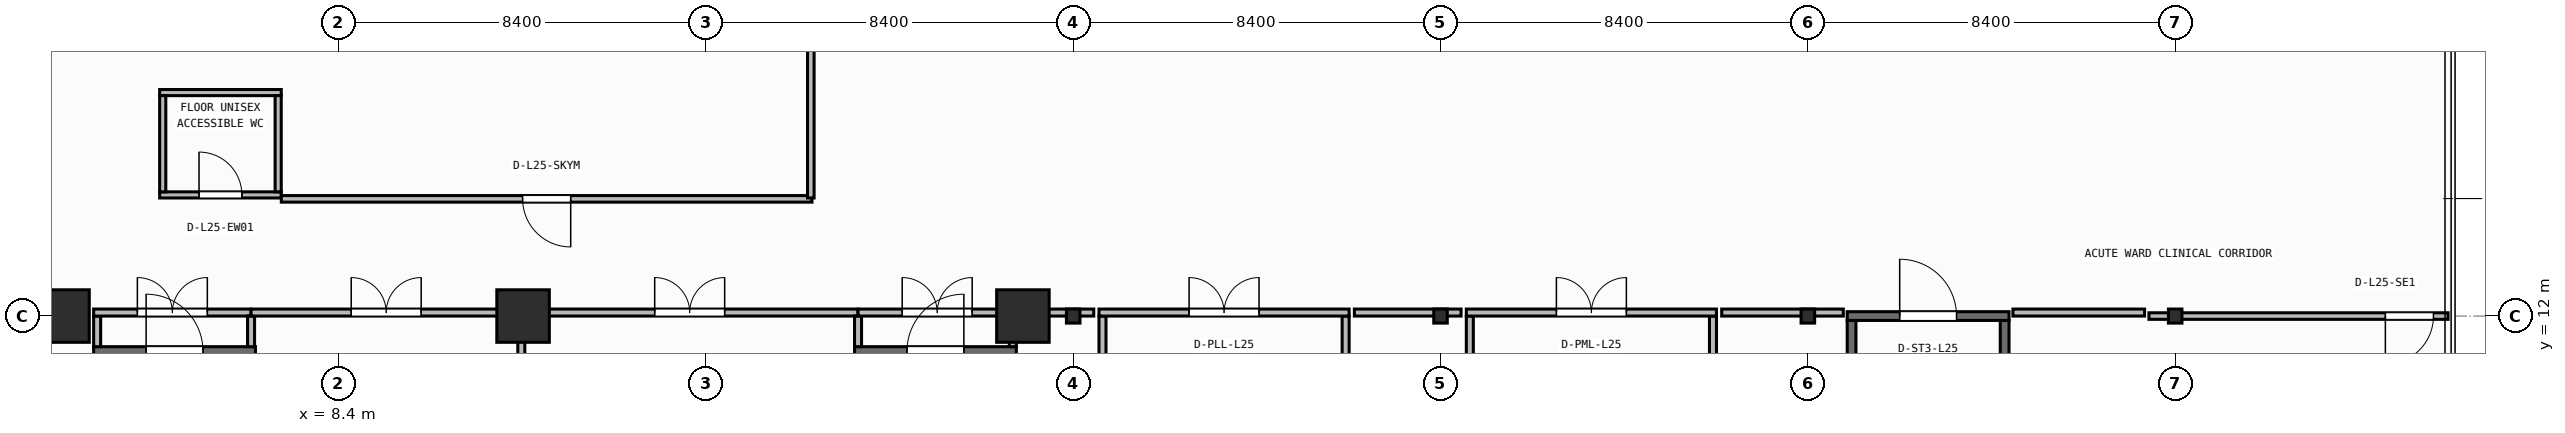
"""IFC4 building model, lengths in metres.
Left out: names, types, materials, properties, quantities, classifications, styles, units other than length and angle.
Written with IfcOpenShell. Run it as: python <this file> out.ifc"""

import sys

from ifc_helpers import new_model, si_unit, direction, frame, frame_2d, origin, origin_2d, place, context, subcontext, project, spatial, rectangle, i_section, extrude, element, fill, save


model = new_model("IFC4")
c1 = context("Model", 3, precision=1e-05, world=origin(), true_north=direction((0.0, 1.0)))
c2 = subcontext(c1, "Body", "Model", "MODEL_VIEW")
j1 = project(units=[si_unit("LENGTHUNIT", "METRE"), si_unit("PLANEANGLEUNIT", "RADIAN")], contexts=[c1])
p1 = place(None, origin())
s1 = spatial("IfcSite", under=j1, at=p1, CompositionType="ELEMENT")
p2 = place(p1, origin())
s2 = spatial("IfcBuilding", under=s1, at=p2, CompositionType="ELEMENT")
p3 = place(p2, frame((0.0, 0.0, 103.35)))
s3 = spatial("IfcBuildingStorey", under=s2, at=p3, CompositionType="ELEMENT", Elevation=103.35)
for number, where, z_axis, x_axis in (
    (1, (2.1, 12.0, 0.0), (0.0, 0.0, 1.0), (1.0, 0.0, 0.0)),
    (2, (12.62, 12.0, 0.0), (0.0, 0.0, 1.0), (1.0, 0.0, 0.0)),
    (3, (24.05, 12.0, 0.0), (0.0, 0.0, 1.0), (1.0, 0.0, 0.0)),
):
    element("IfcColumn", number, at=place(p3, frame(where, z_axis=z_axis, x_axis=x_axis)), inside=s3, PredefinedType="COLUMN", context=c2, shape_type="SweptSolid", body=[
        extrude(rectangle(XDim=1.2, YDim=1.2, at=origin_2d()), origin(), (0.0, 0.0, 1.0), 3.95),
    ])
for number, where, z_axis, x_axis in (
    (4, (25.2, 12.0, 0.0), (0.0, 0.0, 1.0), (1.0, 0.0, 0.0)),
    (5, (33.6, 12.0, 0.0), (0.0, 0.0, 1.0), (1.0, 0.0, 0.0)),
    (6, (42.0, 12.0, 0.0), (0.0, 0.0, 1.0), (1.0, 0.0, 0.0)),
    (7, (50.4, 12.0, 0.0), (0.0, 0.0, 1.0), (1.0, 0.0, 0.0)),
):
    element("IfcColumn", number, at=place(p3, frame(where, z_axis=z_axis, x_axis=x_axis)), inside=s3, PredefinedType="COLUMN", context=c2, shape_type="SweptSolid", body=[
        extrude(i_section(OverallWidth=0.309, OverallDepth=0.321, WebThickness=0.014, FlangeThickness=0.022, FilletRadius=0.017, at=origin_2d()), origin(), (0.0, 0.0, 1.0), 3.95),
    ])
p4 = place(p3, frame((2.8, 11.2, 0.0), z_axis=(0.0, 0.0, 1.0), x_axis=(1.0, 0.0, 0.0)))
e8 = element("IfcWall", 8, at=p4, inside=s3, PredefinedType="SHEAR", context=c2, shape_type="SweptSolid", body=[
    extrude(rectangle(XDim=3.7, YDim=0.2, at=frame_2d((1.85, 0.0))), origin(), (0.0, 0.0, 1.0), 3.71),
])
p5 = place(p4, frame((1.2, 0.0, 0.0)))
e9 = element("IfcOpeningElement", 9, at=p5, cuts=e8, PredefinedType="OPENING", context=c2, shape_type="SweptSolid", body=[
    extrude(rectangle(XDim=1.3, YDim=2.15, at=frame_2d((0.65, 1.075))), frame((0.0, 0.11, 0.0), z_axis=(0.0, -1.0, 0.0), x_axis=(1.0, 0.0, 0.0)), (0.0, 0.0, 1.0), 0.22),
])
p6 = place(p3, frame((20.2, 11.2, 0.0), z_axis=(0.0, 0.0, 1.0), x_axis=(1.0, 0.0, 0.0)))
e10 = element("IfcWall", 10, at=p6, inside=s3, PredefinedType="SHEAR", context=c2, shape_type="SweptSolid", body=[
    extrude(rectangle(XDim=3.7, YDim=0.2, at=frame_2d((1.85, 0.0))), origin(), (0.0, 0.0, 1.0), 3.71),
])
p7 = place(p6, frame((1.2, 0.0, 0.0)))
e11 = element("IfcOpeningElement", 11, at=p7, cuts=e10, PredefinedType="OPENING", context=c2, shape_type="SweptSolid", body=[
    extrude(rectangle(XDim=1.3, YDim=2.15, at=frame_2d((0.65, 1.075))), frame((0.0, 0.11, 0.0), z_axis=(0.0, -1.0, 0.0), x_axis=(1.0, 0.0, 0.0)), (0.0, 0.0, 1.0), 0.22),
])
for number, where, z_axis, x_axis in (
    (12, (43.0, 4.3, 0.0), (0.0, 0.0, 1.0), (0.0, 1.0, 0.0)),
    (13, (46.5, 4.3, 0.0), (0.0, 0.0, 1.0), (0.0, 1.0, 0.0)),
):
    element("IfcWall", number, at=place(p3, frame(where, z_axis=z_axis, x_axis=x_axis)), inside=s3, PredefinedType="SHEAR", context=c2, shape_type="SweptSolid", body=[
        extrude(rectangle(XDim=7.6, YDim=0.2, at=frame_2d((3.8, 0.0))), origin(), (0.0, 0.0, 1.0), 3.71),
    ])
p8 = place(p3, frame((42.9, 12.0, 0.0), z_axis=(0.0, 0.0, 1.0), x_axis=(1.0, 0.0, 0.0)))
e14 = element("IfcWall", 14, at=p8, inside=s3, PredefinedType="SHEAR", context=c2, shape_type="SweptSolid", body=[
    extrude(rectangle(XDim=3.7, YDim=0.2, at=frame_2d((1.85, 0.0))), origin(), (0.0, 0.0, 1.0), 3.71),
])
p9 = place(p8, frame((1.2, 0.0, 0.0)))
e15 = element("IfcOpeningElement", 15, at=p9, cuts=e14, PredefinedType="OPENING", context=c2, shape_type="SweptSolid", body=[
    extrude(rectangle(XDim=1.3, YDim=2.15, at=frame_2d((0.65, 1.075))), frame((0.0, 0.11, 0.0), z_axis=(0.0, -1.0, 0.0), x_axis=(1.0, 0.0, 0.0)), (0.0, 0.0, 1.0), 0.22),
])
p10 = place(p3, frame((2.88, 11.3, 0.0), z_axis=(0.0, 0.0, 1.0), x_axis=(0.0, 1.0, 0.0)))
e16 = element("IfcWall", 16, at=p10, inside=s3, PredefinedType="PARTITIONING", context=c2, shape_type="SweptSolid", body=[
    extrude(rectangle(XDim=0.7, YDim=0.16, at=frame_2d((0.35, 0.0))), origin(), (0.0, 0.0, 1.0), 3.71),
])
p11 = place(p3, frame((2.8, 12.08, 0.0), z_axis=(0.0, 0.0, 1.0), x_axis=(1.0, 0.0, 0.0)))
e17 = element("IfcWall", 17, at=p11, inside=s3, PredefinedType="PARTITIONING", context=c2, shape_type="SweptSolid", body=[
    extrude(rectangle(XDim=3.6, YDim=0.16, at=frame_2d((1.8, 0.0))), origin(), (0.0, 0.0, 1.0), 3.083),
])
p12 = place(p11, frame((1.0, 0.0, 0.0)))
e18 = element("IfcOpeningElement", 18, at=p12, cuts=e17, PredefinedType="OPENING", context=c2, shape_type="SweptSolid", body=[
    extrude(rectangle(XDim=1.6, YDim=2.05, at=frame_2d((0.8, 1.025))), frame((0.0, 0.09, 0.0), z_axis=(0.0, -1.0, 0.0), x_axis=(1.0, 0.0, 0.0)), (0.0, 0.0, 1.0), 0.18),
])
p13 = place(p3, frame((6.4, 11.3, 0.0), z_axis=(0.0, 0.0, 1.0), x_axis=(0.0, 1.0, 0.0)))
e19 = element("IfcWall", 19, at=p13, inside=s3, PredefinedType="PARTITIONING", context=c2, shape_type="SweptSolid", body=[
    extrude(rectangle(XDim=0.7, YDim=0.16, at=frame_2d((0.35, 0.0))), origin(), (0.0, 0.0, 1.0), 3.71),
])
p14 = place(p3, frame((6.4, 12.08, 0.0), z_axis=(0.0, 0.0, 1.0), x_axis=(1.0, 0.0, 0.0)))
e20 = element("IfcWall", 20, at=p14, inside=s3, PredefinedType="PARTITIONING", context=c2, shape_type="SweptSolid", body=[
    extrude(rectangle(XDim=6.18, YDim=0.16, at=frame_2d((3.09, 0.0))), origin(), (0.0, 0.0, 1.0), 3.083),
])
p15 = place(p14, frame((2.29, 0.0, 0.0)))
e21 = element("IfcOpeningElement", 21, at=p15, cuts=e20, PredefinedType="OPENING", context=c2, shape_type="SweptSolid", body=[
    extrude(rectangle(XDim=1.6, YDim=2.05, at=frame_2d((0.8, 1.025))), frame((0.0, 0.09, 0.0), z_axis=(0.0, -1.0, 0.0), x_axis=(1.0, 0.0, 0.0)), (0.0, 0.0, 1.0), 0.18),
])
p16 = place(p3, frame((12.58, 9.21, 0.0), z_axis=(0.0, 0.0, 1.0), x_axis=(0.0, 1.0, 0.0)))
e22 = element("IfcWall", 22, at=p16, inside=s3, PredefinedType="PARTITIONING", context=c2, shape_type="SweptSolid", body=[
    extrude(rectangle(XDim=2.79, YDim=0.16, at=frame_2d((1.395, 0.0))), origin(), (0.0, 0.0, 1.0), 3.71),
])
p17 = place(p3, frame((12.58, 12.08, 0.0), z_axis=(0.0, 0.0, 1.0), x_axis=(1.0, 0.0, 0.0)))
e23 = element("IfcWall", 23, at=p17, inside=s3, PredefinedType="PARTITIONING", context=c2, shape_type="SweptSolid", body=[
    extrude(rectangle(XDim=7.7, YDim=0.16, at=frame_2d((3.85, 0.0))), origin(), (0.0, 0.0, 1.0), 3.083),
])
p18 = place(p17, frame((3.05, 0.0, 0.0)))
e24 = element("IfcOpeningElement", 24, at=p18, cuts=e23, PredefinedType="OPENING", context=c2, shape_type="SweptSolid", body=[
    extrude(rectangle(XDim=1.6, YDim=2.05, at=frame_2d((0.8, 1.025))), frame((0.0, 0.09, 0.0), z_axis=(0.0, -1.0, 0.0), x_axis=(1.0, 0.0, 0.0)), (0.0, 0.0, 1.0), 0.18),
])
p19 = place(p3, frame((20.28, 11.3, 0.0), z_axis=(0.0, 0.0, 1.0), x_axis=(0.0, 1.0, 0.0)))
e25 = element("IfcWall", 25, at=p19, inside=s3, PredefinedType="PARTITIONING", context=c2, shape_type="SweptSolid", body=[
    extrude(rectangle(XDim=0.7, YDim=0.16, at=frame_2d((0.35, 0.0))), origin(), (0.0, 0.0, 1.0), 3.71),
])
p20 = place(p3, frame((20.28, 12.08, 0.0), z_axis=(0.0, 0.0, 1.0), x_axis=(1.0, 0.0, 0.0)))
e26 = element("IfcWall", 26, at=p20, inside=s3, PredefinedType="PARTITIONING", context=c2, shape_type="SweptSolid", body=[
    extrude(rectangle(XDim=3.62, YDim=0.16, at=frame_2d((1.81, 0.0))), origin(), (0.0, 0.0, 1.0), 3.083),
])
p21 = place(p20, frame((1.01, 0.0, 0.0)))
e27 = element("IfcOpeningElement", 27, at=p21, cuts=e26, PredefinedType="OPENING", context=c2, shape_type="SweptSolid", body=[
    extrude(rectangle(XDim=1.6, YDim=2.05, at=frame_2d((0.8, 1.025))), frame((0.0, 0.09, 0.0), z_axis=(0.0, -1.0, 0.0), x_axis=(1.0, 0.0, 0.0)), (0.0, 0.0, 1.0), 0.18),
])
p22 = place(p3, frame((23.82, 11.3, 0.0), z_axis=(0.0, 0.0, 1.0), x_axis=(0.0, 1.0, 0.0)))
e28 = element("IfcWall", 28, at=p22, inside=s3, PredefinedType="PARTITIONING", context=c2, shape_type="SweptSolid", body=[
    extrude(rectangle(XDim=0.7, YDim=0.16, at=frame_2d((0.35, 0.0))), origin(), (0.0, 0.0, 1.0), 3.71),
])
for number, where, z_axis, x_axis in (
    (29, (25.87, 8.61, 0.0), (0.0, 0.0, 1.0), (0.0, 1.0, 0.0)),
    (30, (31.43, 8.61, 0.0), (0.0, 0.0, 1.0), (0.0, 1.0, 0.0)),
):
    element("IfcWall", number, at=place(p3, frame(where, z_axis=z_axis, x_axis=x_axis)), inside=s3, PredefinedType="PARTITIONING", context=c2, shape_type="SweptSolid", body=[
        extrude(rectangle(XDim=3.39, YDim=0.16, at=frame_2d((1.695, 0.0))), origin(), (0.0, 0.0, 1.0), 3.71),
    ])
p23 = place(p3, frame((25.79, 12.08, 0.0), z_axis=(0.0, 0.0, 1.0), x_axis=(1.0, 0.0, 0.0)))
e31 = element("IfcWall", 31, at=p23, inside=s3, PredefinedType="PARTITIONING", context=c2, shape_type="SweptSolid", body=[
    extrude(rectangle(XDim=5.72, YDim=0.16, at=frame_2d((2.86, 0.0))), origin(), (0.0, 0.0, 1.0), 3.083),
])
p24 = place(p23, frame((2.06, 0.0, 0.0)))
e32 = element("IfcOpeningElement", 32, at=p24, cuts=e31, PredefinedType="OPENING", context=c2, shape_type="SweptSolid", body=[
    extrude(rectangle(XDim=1.6, YDim=2.05, at=frame_2d((0.8, 1.025))), frame((0.0, 0.09, 0.0), z_axis=(0.0, -1.0, 0.0), x_axis=(1.0, 0.0, 0.0)), (0.0, 0.0, 1.0), 0.18),
])
for number, where, z_axis, x_axis in (
    (33, (34.27, 8.61, 0.0), (0.0, 0.0, 1.0), (0.0, 1.0, 0.0)),
    (34, (39.83, 8.61, 0.0), (0.0, 0.0, 1.0), (0.0, 1.0, 0.0)),
):
    element("IfcWall", number, at=place(p3, frame(where, z_axis=z_axis, x_axis=x_axis)), inside=s3, PredefinedType="PARTITIONING", context=c2, shape_type="SweptSolid", body=[
        extrude(rectangle(XDim=3.39, YDim=0.16, at=frame_2d((1.695, 0.0))), origin(), (0.0, 0.0, 1.0), 3.71),
    ])
p25 = place(p3, frame((34.19, 12.08, 0.0), z_axis=(0.0, 0.0, 1.0), x_axis=(1.0, 0.0, 0.0)))
e35 = element("IfcWall", 35, at=p25, inside=s3, PredefinedType="PARTITIONING", context=c2, shape_type="SweptSolid", body=[
    extrude(rectangle(XDim=5.72, YDim=0.16, at=frame_2d((2.86, 0.0))), origin(), (0.0, 0.0, 1.0), 3.083),
])
p26 = place(p25, frame((2.06, 0.0, 0.0)))
e36 = element("IfcOpeningElement", 36, at=p26, cuts=e35, PredefinedType="OPENING", context=c2, shape_type="SweptSolid", body=[
    extrude(rectangle(XDim=1.6, YDim=2.05, at=frame_2d((0.8, 1.025))), frame((0.0, 0.09, 0.0), z_axis=(0.0, -1.0, 0.0), x_axis=(1.0, 0.0, 0.0)), (0.0, 0.0, 1.0), 0.18),
])
p27 = place(p3, frame((4.31, 14.77, 0.0), z_axis=(0.0, 0.0, 1.0), x_axis=(1.0, 0.0, 0.0)))
e37 = element("IfcWall", 37, at=p27, inside=s3, PredefinedType="PARTITIONING", context=c2, shape_type="SweptSolid", body=[
    extrude(rectangle(XDim=2.78, YDim=0.14, at=frame_2d((1.39, 0.0))), origin(), (0.0, 0.0, 1.0), 3.71),
])
p28 = place(p27, frame((0.9, 0.0, 0.0)))
e38 = element("IfcOpeningElement", 38, at=p28, cuts=e37, PredefinedType="OPENING", context=c2, shape_type="SweptSolid", body=[
    extrude(rectangle(XDim=0.98, YDim=2.1, at=frame_2d((0.49, 1.05))), frame((0.0, 0.08, 0.0), z_axis=(0.0, -1.0, 0.0), x_axis=(1.0, 0.0, 0.0)), (0.0, 0.0, 1.0), 0.16),
])
p29 = place(p3, frame((4.31, 17.11, 0.0), z_axis=(0.0, 0.0, 1.0), x_axis=(1.0, 0.0, 0.0)))
e39 = element("IfcWall", 39, at=p29, inside=s3, PredefinedType="PARTITIONING", context=c2, shape_type="SweptSolid", body=[
    extrude(rectangle(XDim=2.78, YDim=0.14, at=frame_2d((1.39, 0.0))), origin(), (0.0, 0.0, 1.0), 3.71),
])
for number, where, z_axis, x_axis in (
    (40, (4.38, 14.84, 0.0), (0.0, 0.0, 1.0), (0.0, 1.0, 0.0)),
    (41, (7.02, 14.84, 0.0), (0.0, 0.0, 1.0), (0.0, 1.0, 0.0)),
):
    element("IfcWall", number, at=place(p3, frame(where, z_axis=z_axis, x_axis=x_axis)), inside=s3, PredefinedType="PARTITIONING", context=c2, shape_type="SweptSolid", body=[
        extrude(rectangle(XDim=2.2, YDim=0.14, at=frame_2d((1.1, 0.0))), origin(), (0.0, 0.0, 1.0), 3.71),
    ])
p30 = place(p3, frame((56.64, 12.0, 0.0), z_axis=(0.0, 0.0, 1.0), x_axis=(-1.0, 0.0, 0.0)))
e42 = element("IfcWall", 42, at=p30, inside=s3, PredefinedType="PARTITIONING", context=c2, shape_type="SweptSolid", body=[
    extrude(rectangle(XDim=6.84, YDim=0.15, at=frame_2d((3.42, 0.0))), origin(), (0.0, 0.0, 1.0), 3.083),
])
p31 = place(p30, frame((0.333, 0.0, 0.0)))
e43 = element("IfcOpeningElement", 43, at=p31, cuts=e42, PredefinedType="OPENING", context=c2, shape_type="SweptSolid", body=[
    extrude(rectangle(XDim=1.1, YDim=2.1, at=frame_2d((0.55, 1.05))), frame((0.0, 0.085, 0.0), z_axis=(0.0, -1.0, 0.0), x_axis=(1.0, 0.0, 0.0)), (0.0, 0.0, 1.0), 0.17),
])
p32 = place(p3, frame((19.226, 14.68, 0.0), z_axis=(0.0, 0.0, 1.0), x_axis=(-1.0, 0.0, 0.0)))
e44 = element("IfcWall", 44, at=p32, inside=s3, PredefinedType="PARTITIONING", context=c2, shape_type="SweptSolid", body=[
    extrude(rectangle(XDim=12.134, YDim=0.15, at=frame_2d((6.067, 0.0))), origin(), (0.0, 0.0, 1.0), 3.71),
])
p33 = place(p32, frame((5.517, 0.0, 0.0)))
e45 = element("IfcOpeningElement", 45, at=p33, cuts=e44, PredefinedType="OPENING", context=c2, shape_type="SweptSolid", body=[
    extrude(rectangle(XDim=1.1, YDim=2.1, at=frame_2d((0.55, 1.05))), frame((0.0, 0.085, 0.0), z_axis=(0.0, -1.0, 0.0), x_axis=(1.0, 0.0, 0.0)), (0.0, 0.0, 1.0), 0.17),
])
p34 = place(p3, frame((19.2, 25.052, 0.0), z_axis=(0.0, 0.0, 1.0), x_axis=(0.0, -1.0, 0.0)))
e46 = element("IfcWall", 46, at=p34, inside=s3, PredefinedType="PARTITIONING", context=c2, shape_type="SweptSolid", body=[
    extrude(rectangle(XDim=10.353, YDim=0.15, at=frame_2d((5.176, 0.0))), origin(), (0.0, 0.0, 1.0), 3.71),
])
p35 = place(p3, frame((24.02, 12.08, 0.0), z_axis=(0.0, 0.0, 1.0), x_axis=(1.0, 0.0, 0.0)))
e47 = element("IfcWall", 47, at=p35, inside=s3, PredefinedType="PARTITIONING", context=c2, shape_type="SweptSolid", body=[
    extrude(rectangle(XDim=1.65, YDim=0.16, at=frame_2d((0.825, 0.0))), origin(), (0.0, 0.0, 1.0), 3.083),
])
p36 = place(p3, frame((31.63, 12.08, 0.0), z_axis=(0.0, 0.0, 1.0), x_axis=(1.0, 0.0, 0.0)))
e48 = element("IfcWall", 48, at=p36, inside=s3, PredefinedType="PARTITIONING", context=c2, shape_type="SweptSolid", body=[
    extrude(rectangle(XDim=2.44, YDim=0.16, at=frame_2d((1.22, 0.0))), origin(), (0.0, 0.0, 1.0), 3.083),
])
p37 = place(p3, frame((40.03, 12.08, 0.0), z_axis=(0.0, 0.0, 1.0), x_axis=(1.0, 0.0, 0.0)))
e49 = element("IfcWall", 49, at=p37, inside=s3, PredefinedType="PARTITIONING", context=c2, shape_type="SweptSolid", body=[
    extrude(rectangle(XDim=2.781, YDim=0.16, at=frame_2d((1.39, 0.0))), origin(), (0.0, 0.0, 1.0), 3.083),
])
p38 = place(p3, frame((46.689, 12.08, 0.0), z_axis=(0.0, 0.0, 1.0), x_axis=(1.0, 0.0, 0.0)))
e50 = element("IfcWall", 50, at=p38, inside=s3, PredefinedType="PARTITIONING", context=c2, shape_type="SweptSolid", body=[
    extrude(rectangle(XDim=3.011, YDim=0.16, at=frame_2d((1.505, 0.0))), origin(), (0.0, 0.0, 1.0), 3.083),
])
p39 = place(p5, origin())
e51 = element("IfcDoor", 51, at=p39, inside=s3, OperationType="SINGLE_SWING_LEFT", PredefinedType="DOOR", context=c2, shape_type="SweptSolid", body=[
    extrude(rectangle(XDim=1.3, YDim=2.15, at=frame_2d((0.65, 1.075))), frame((0.0, 0.025, 0.0), z_axis=(0.0, -1.0, 0.0), x_axis=(1.0, 0.0, 0.0)), (0.0, 0.0, 1.0), 0.05),
])
fill(e9, e51)
p40 = place(p7, origin())
e52 = element("IfcDoor", 52, at=p40, inside=s3, OperationType="SINGLE_SWING_RIGHT", PredefinedType="DOOR", context=c2, shape_type="SweptSolid", body=[
    extrude(rectangle(XDim=1.3, YDim=2.15, at=frame_2d((0.65, 1.075))), frame((0.0, 0.025, 0.0), z_axis=(0.0, -1.0, 0.0), x_axis=(1.0, 0.0, 0.0)), (0.0, 0.0, 1.0), 0.05),
])
fill(e11, e52)
p41 = place(p9, origin())
e53 = element("IfcDoor", 53, at=p41, inside=s3, OperationType="SINGLE_SWING_LEFT", PredefinedType="DOOR", context=c2, shape_type="SweptSolid", body=[
    extrude(rectangle(XDim=1.3, YDim=2.15, at=frame_2d((0.65, 1.075))), frame((0.0, 0.025, 0.0), z_axis=(0.0, -1.0, 0.0), x_axis=(1.0, 0.0, 0.0)), (0.0, 0.0, 1.0), 0.05),
])
fill(e15, e53)
p42 = place(p12, origin())
e54 = element("IfcDoor", 54, at=p42, inside=s3, OperationType="DOUBLE_DOOR_SINGLE_SWING", PredefinedType="DOOR", context=c2, shape_type="SweptSolid", body=[
    extrude(rectangle(XDim=1.6, YDim=2.05, at=frame_2d((0.8, 1.025))), frame((0.0, 0.025, 0.0), z_axis=(0.0, -1.0, 0.0), x_axis=(1.0, 0.0, 0.0)), (0.0, 0.0, 1.0), 0.05),
])
fill(e18, e54)
p43 = place(p15, origin())
e55 = element("IfcDoor", 55, at=p43, inside=s3, OperationType="DOUBLE_DOOR_SINGLE_SWING", PredefinedType="DOOR", context=c2, shape_type="SweptSolid", body=[
    extrude(rectangle(XDim=1.6, YDim=2.05, at=frame_2d((0.8, 1.025))), frame((0.0, 0.025, 0.0), z_axis=(0.0, -1.0, 0.0), x_axis=(1.0, 0.0, 0.0)), (0.0, 0.0, 1.0), 0.05),
])
fill(e21, e55)
p44 = place(p18, origin())
e56 = element("IfcDoor", 56, at=p44, inside=s3, OperationType="DOUBLE_DOOR_SINGLE_SWING", PredefinedType="DOOR", context=c2, shape_type="SweptSolid", body=[
    extrude(rectangle(XDim=1.6, YDim=2.05, at=frame_2d((0.8, 1.025))), frame((0.0, 0.025, 0.0), z_axis=(0.0, -1.0, 0.0), x_axis=(1.0, 0.0, 0.0)), (0.0, 0.0, 1.0), 0.05),
])
fill(e24, e56)
p45 = place(p21, origin())
e57 = element("IfcDoor", 57, at=p45, inside=s3, OperationType="DOUBLE_DOOR_SINGLE_SWING", PredefinedType="DOOR", context=c2, shape_type="SweptSolid", body=[
    extrude(rectangle(XDim=1.6, YDim=2.05, at=frame_2d((0.8, 1.025))), frame((0.0, 0.025, 0.0), z_axis=(0.0, -1.0, 0.0), x_axis=(1.0, 0.0, 0.0)), (0.0, 0.0, 1.0), 0.05),
])
fill(e27, e57)
p46 = place(p24, origin())
e58 = element("IfcDoor", 58, at=p46, inside=s3, OperationType="DOUBLE_DOOR_SINGLE_SWING", PredefinedType="DOOR", context=c2, shape_type="SweptSolid", body=[
    extrude(rectangle(XDim=1.6, YDim=2.05, at=frame_2d((0.8, 1.025))), frame((0.0, 0.025, 0.0), z_axis=(0.0, -1.0, 0.0), x_axis=(1.0, 0.0, 0.0)), (0.0, 0.0, 1.0), 0.05),
])
fill(e32, e58)
p47 = place(p26, origin())
e59 = element("IfcDoor", 59, at=p47, inside=s3, OperationType="DOUBLE_DOOR_SINGLE_SWING", PredefinedType="DOOR", context=c2, shape_type="SweptSolid", body=[
    extrude(rectangle(XDim=1.6, YDim=2.05, at=frame_2d((0.8, 1.025))), frame((0.0, 0.025, 0.0), z_axis=(0.0, -1.0, 0.0), x_axis=(1.0, 0.0, 0.0)), (0.0, 0.0, 1.0), 0.05),
])
fill(e36, e59)
p48 = place(p28, origin())
e60 = element("IfcDoor", 60, at=p48, inside=s3, OperationType="SINGLE_SWING_LEFT", PredefinedType="DOOR", context=c2, shape_type="SweptSolid", body=[
    extrude(rectangle(XDim=0.98, YDim=2.1, at=frame_2d((0.49, 1.05))), frame((0.0, 0.025, 0.0), z_axis=(0.0, -1.0, 0.0), x_axis=(1.0, 0.0, 0.0)), (0.0, 0.0, 1.0), 0.05),
])
fill(e38, e60)
p49 = place(p31, origin())
e61 = element("IfcDoor", 61, at=p49, inside=s3, OperationType="SINGLE_SWING_RIGHT", PredefinedType="DOOR", context=c2, shape_type="SweptSolid", body=[
    extrude(rectangle(XDim=1.1, YDim=2.1, at=frame_2d((0.55, 1.05))), frame((0.0, 0.025, 0.0), z_axis=(0.0, -1.0, 0.0), x_axis=(1.0, 0.0, 0.0)), (0.0, 0.0, 1.0), 0.05),
])
fill(e43, e61)
p50 = place(p33, origin())
e62 = element("IfcDoor", 62, at=p50, inside=s3, OperationType="SINGLE_SWING_LEFT", PredefinedType="DOOR", context=c2, shape_type="SweptSolid", body=[
    extrude(rectangle(XDim=1.1, YDim=2.1, at=frame_2d((0.55, 1.05))), frame((0.0, 0.025, 0.0), z_axis=(0.0, -1.0, 0.0), x_axis=(1.0, 0.0, 0.0)), (0.0, 0.0, 1.0), 0.05),
])
fill(e45, e62)
save(model, sys.argv[1])
